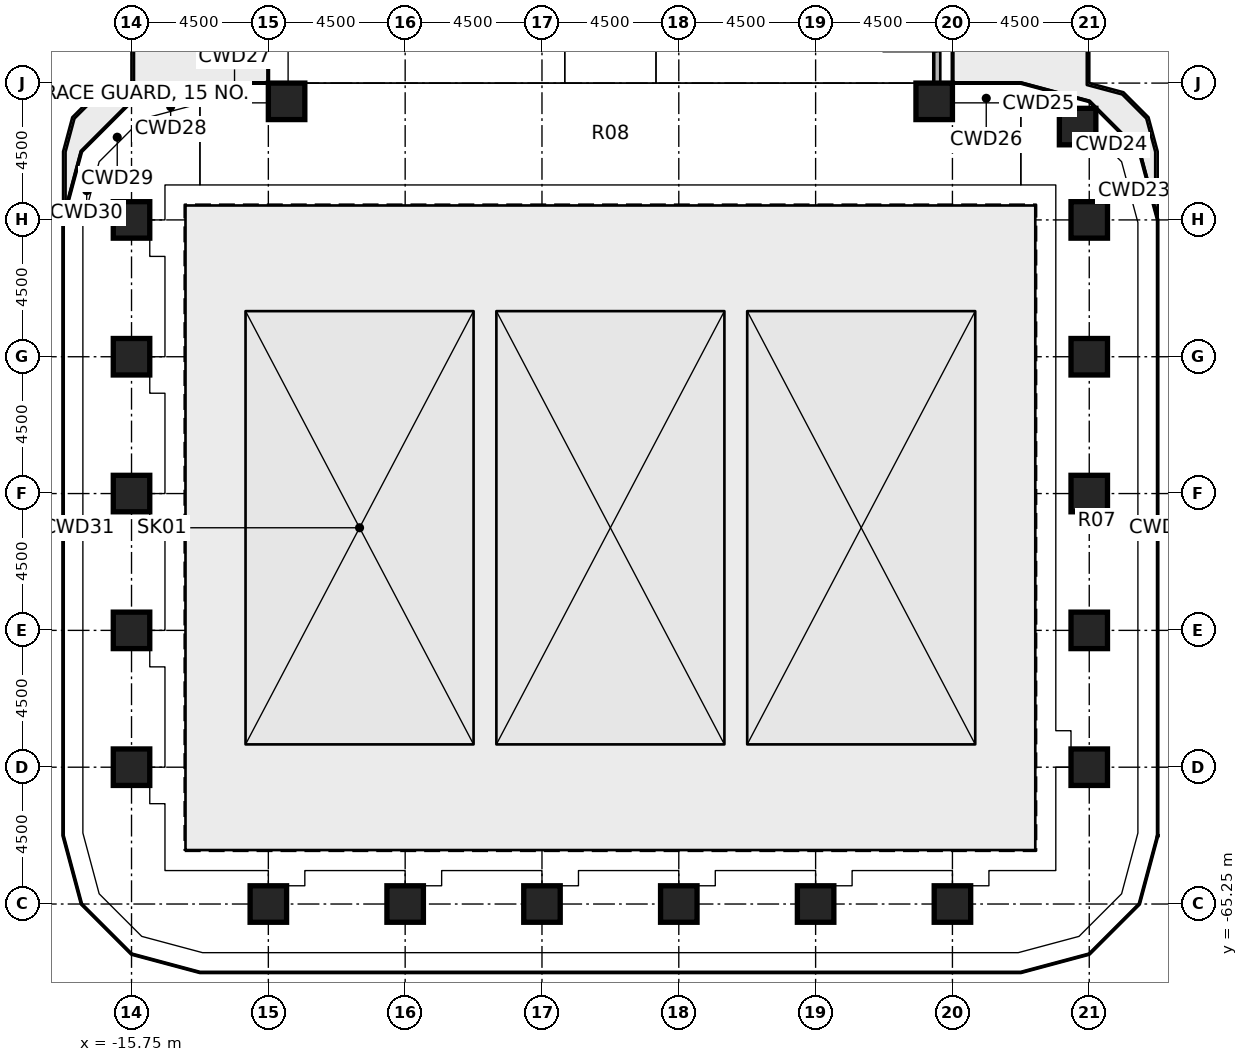
"""IFC4 building model, lengths in metres.
Left out: names, types, materials, properties, quantities, classifications, styles, units other than length and angle.
Written with IfcOpenShell. Run it as: python <this file> out.ifc"""

import sys

from ifc_helpers import new_model, si_unit, direction, frame, frame_2d, origin, origin_2d, place, context, subcontext, project, spatial, rectangle, extrude, element, save


model = new_model("IFC4")
c1 = context("Model", 3, precision=1e-05, world=origin(), true_north=direction((0.0, 1.0)))
c2 = subcontext(c1, "Body", "Model", "MODEL_VIEW")
j1 = project(units=[si_unit("LENGTHUNIT", "METRE"), si_unit("PLANEANGLEUNIT", "RADIAN")], contexts=[c1])
p1 = place(None, origin())
s1 = spatial("IfcSite", under=j1, at=p1, CompositionType="ELEMENT")
p2 = place(p1, origin())
s2 = spatial("IfcBuilding", under=s1, at=p2, CompositionType="ELEMENT")
p3 = place(p2, frame((0.0, 0.0, 22.0)))
s3 = spatial("IfcBuildingStorey", under=s2, at=p3, CompositionType="ELEMENT", Elevation=22.0)
for number, where, z_axis, x_axis in (
    (1, (-15.75, -60.75, 0.0), (0.0, 0.0, 1.0), (1.0, 0.0, 0.0)),
    (2, (-15.75, -56.25, 0.0), (0.0, 0.0, 1.0), (1.0, 0.0, 0.0)),
    (3, (-15.75, -51.75, 0.0), (0.0, 0.0, 1.0), (1.0, 0.0, 0.0)),
    (4, (-15.75, -47.25, 0.0), (0.0, 0.0, 1.0), (1.0, 0.0, 0.0)),
    (5, (-15.75, -42.75, 0.0), (0.0, 0.0, 1.0), (1.0, 0.0, 0.0)),
    (6, (-11.25, -65.25, 0.0), (0.0, 0.0, 1.0), (1.0, 0.0, 0.0)),
    (7, (-10.65, -38.85, 0.0), (0.0, 0.0, 1.0), (1.0, 0.0, 0.0)),
    (8, (-6.75, -65.25, 0.0), (0.0, 0.0, 1.0), (1.0, 0.0, 0.0)),
    (9, (-2.25, -65.25, 0.0), (0.0, 0.0, 1.0), (1.0, 0.0, 0.0)),
    (10, (2.25, -65.25, 0.0), (0.0, 0.0, 1.0), (1.0, 0.0, 0.0)),
    (11, (6.75, -65.25, 0.0), (0.0, 0.0, 1.0), (1.0, 0.0, 0.0)),
    (12, (11.25, -65.25, 0.0), (0.0, 0.0, 1.0), (1.0, 0.0, 0.0)),
    (13, (10.65, -38.85, 0.0), (0.0, 0.0, 1.0), (1.0, 0.0, 0.0)),
    (14, (15.75, -60.75, 0.0), (0.0, 0.0, 1.0), (1.0, 0.0, 0.0)),
    (15, (15.75, -56.25, 0.0), (0.0, 0.0, 1.0), (1.0, 0.0, 0.0)),
    (16, (15.75, -51.75, 0.0), (0.0, 0.0, 1.0), (1.0, 0.0, 0.0)),
    (17, (15.75, -47.25, 0.0), (0.0, 0.0, 1.0), (1.0, 0.0, 0.0)),
    (18, (15.75, -42.75, 0.0), (0.0, 0.0, 1.0), (1.0, 0.0, 0.0)),
    (19, (15.367, -39.68, 0.0), (0.0, 0.0, 1.0), (1.0, 0.0, 0.0)),
):
    element("IfcColumn", number, at=place(p3, frame(where, z_axis=z_axis, x_axis=x_axis)), inside=s3, PredefinedType="COLUMN", context=c2, shape_type="SweptSolid", body=[
        extrude(rectangle(XDim=1.2, YDim=1.2, at=origin_2d()), origin(), (0.0, 0.0, 1.0), 4.55),
    ])
p4 = place(p3, frame((10.75, -38.25, 0.0), z_axis=(0.0, 0.0, 1.0), x_axis=(0.0, 1.0, 0.0)))
e20 = element("IfcWall", 20, at=p4, inside=s3, PredefinedType="SOLIDWALL", context=c2, shape_type="SweptSolid", body=[
    extrude(rectangle(XDim=3.9, YDim=0.2, at=frame_2d((1.95, 0.0))), origin(), (0.0, 0.0, 1.0), 3.95),
])
p5 = place(p4, frame((1.05, 0.0, 0.0)))
e21 = element("IfcOpeningElement", 21, at=p5, cuts=e20, PredefinedType="OPENING", context=c2, shape_type="SweptSolid", body=[
    extrude(rectangle(XDim=1.8, YDim=2.4, at=frame_2d((0.9, 1.2))), frame((0.0, 0.11, 0.0), z_axis=(0.0, -1.0, 0.0), x_axis=(1.0, 0.0, 0.0)), (0.0, 0.0, 1.0), 0.22),
])
p6 = place(p3, frame((0.0, 0.0, -0.45)))
p7 = place(p6, frame((-8.25, -52.875, 0.0)))
p8 = place(p7, frame((0.0, 0.0, 0.4)))
e22 = element("IfcWindow", 22, at=p8, inside=s3, PartitioningType="SINGLE_PANEL", PredefinedType="SKYLIGHT", context=c2, shape_type="SweptSolid", body=[
    extrude(rectangle(XDim=7.5, YDim=14.25, at=origin_2d()), origin(), (0.0, 0.0, 1.0), 0.05),
])
p9 = place(p6, frame((0.0, -52.875, 0.0)))
p10 = place(p9, frame((0.0, 0.0, 0.4)))
e23 = element("IfcWindow", 23, at=p10, inside=s3, PartitioningType="SINGLE_PANEL", PredefinedType="SKYLIGHT", context=c2, shape_type="SweptSolid", body=[
    extrude(rectangle(XDim=7.5, YDim=14.25, at=origin_2d()), origin(), (0.0, 0.0, 1.0), 0.05),
])
p11 = place(p6, frame((8.25, -52.875, 0.0)))
p12 = place(p11, frame((0.0, 0.0, 0.4)))
e24 = element("IfcWindow", 24, at=p12, inside=s3, PartitioningType="SINGLE_PANEL", PredefinedType="SKYLIGHT", context=c2, shape_type="SweptSolid", body=[
    extrude(rectangle(XDim=7.5, YDim=14.25, at=origin_2d()), origin(), (0.0, 0.0, 1.0), 0.05),
])
save(model, sys.argv[1])
